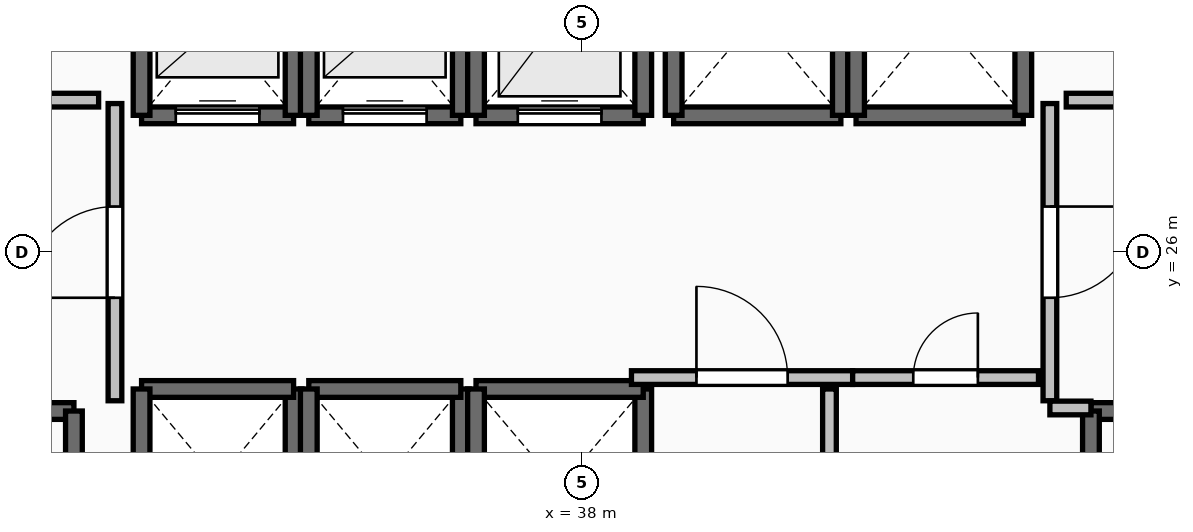
"""IFC4 building model, lengths in metres.
Left out: names, types, materials, properties, quantities, classifications, styles, units other than length and angle.
Written with IfcOpenShell. Run it as: python <this file> out.ifc"""

import sys

from ifc_helpers import new_model, si_unit, direction, frame, frame_2d, origin, place, context, subcontext, project, spatial, rectangle, extrude, element, fill, save


model = new_model("IFC4")
c1 = context("Model", 3, precision=1e-05, world=origin(), true_north=direction((0.0, 1.0)))
c2 = subcontext(c1, "Body", "Model", "MODEL_VIEW")
j1 = project(units=[si_unit("LENGTHUNIT", "METRE"), si_unit("PLANEANGLEUNIT", "RADIAN")], contexts=[c1])
p1 = place(None, origin())
s1 = spatial("IfcSite", under=j1, at=p1, CompositionType="ELEMENT")
p2 = place(p1, origin())
s2 = spatial("IfcBuilding", under=s1, at=p2, CompositionType="ELEMENT")
p3 = place(p2, frame((0.0, 0.0, 82.3)))
s3 = spatial("IfcBuildingStorey", under=s2, at=p3, CompositionType="ELEMENT", Elevation=82.3)
p4 = place(p3, frame((27.94, 23.91, 0.0), z_axis=(0.0, 0.0, 1.0), x_axis=(1.0, 0.0, 0.0)))
e1 = element("IfcWall", 1, at=p4, inside=s3, PredefinedType="SOLIDWALL", context=c2, shape_type="SweptSolid", body=[
    extrude(rectangle(XDim=3.37, YDim=0.22, at=frame_2d((1.685, 0.0))), origin(), (0.0, 0.0, 1.0), 3.24),
])
p5 = place(p4, frame((1.135, 0.0, 0.0)))
e2 = element("IfcOpeningElement", 2, at=p5, cuts=e1, PredefinedType="OPENING", context=c2, shape_type="SweptSolid", body=[
    extrude(rectangle(XDim=1.1, YDim=2.15, at=frame_2d((0.55, 1.075))), frame((0.0, 0.125, 0.0), z_axis=(0.0, -1.0, 0.0), x_axis=(1.0, 0.0, 0.0)), (0.0, 0.0, 1.0), 0.25),
])
p6 = place(p3, frame((31.31, 23.91, 0.0), z_axis=(0.0, 0.0, 1.0), x_axis=(0.0, -1.0, 0.0)))
e3 = element("IfcWall", 3, at=p6, inside=s3, PredefinedType="SOLIDWALL", context=c2, shape_type="SweptSolid", body=[
    extrude(rectangle(XDim=7.42, YDim=0.22, at=frame_2d((3.71, 0.0))), origin(), (0.0, 0.0, 1.0), 3.24),
])
p7 = place(p3, frame((44.69, 23.91, 0.0), z_axis=(0.0, 0.0, 1.0), x_axis=(1.0, 0.0, 0.0)))
e4 = element("IfcWall", 4, at=p7, inside=s3, PredefinedType="SOLIDWALL", context=c2, shape_type="SweptSolid", body=[
    extrude(rectangle(XDim=3.37, YDim=0.22, at=frame_2d((1.685, 0.0))), origin(), (0.0, 0.0, 1.0), 3.24),
])
p8 = place(p7, frame((1.135, 0.0, 0.0)))
e5 = element("IfcOpeningElement", 5, at=p8, cuts=e4, PredefinedType="OPENING", context=c2, shape_type="SweptSolid", body=[
    extrude(rectangle(XDim=1.1, YDim=2.15, at=frame_2d((0.55, 1.075))), frame((0.0, 0.125, 0.0), z_axis=(0.0, -1.0, 0.0), x_axis=(1.0, 0.0, 0.0)), (0.0, 0.0, 1.0), 0.25),
])
p9 = place(p3, frame((44.69, 16.49, 0.0), z_axis=(0.0, 0.0, 1.0), x_axis=(0.0, 1.0, 0.0)))
e6 = element("IfcWall", 6, at=p9, inside=s3, PredefinedType="SOLIDWALL", context=c2, shape_type="SweptSolid", body=[
    extrude(rectangle(XDim=7.42, YDim=0.22, at=frame_2d((3.71, 0.0))), origin(), (0.0, 0.0, 1.0), 3.24),
])
p10 = place(p3, frame((32.2, 27.8, 0.0), z_axis=(0.0, 0.0, 1.0), x_axis=(1.0, 0.0, 0.0)))
e7 = element("IfcWall", 7, at=p10, inside=s3, PredefinedType="SOLIDWALL", context=c2, shape_type="SweptSolid", body=[
    extrude(rectangle(XDim=2.0, YDim=0.22, at=frame_2d((1.0, 0.0))), origin(), (0.0, 0.0, 1.0), 3.24),
])
p11 = place(p10, frame((0.45, 0.0, 0.0)))
e8 = element("IfcOpeningElement", 8, at=p11, cuts=e7, PredefinedType="OPENING", context=c2, shape_type="SweptSolid", body=[
    extrude(rectangle(XDim=1.1, YDim=2.2, at=frame_2d((0.55, 1.1))), frame((0.0, 0.125, 0.0), z_axis=(0.0, -1.0, 0.0), x_axis=(1.0, 0.0, 0.0)), (0.0, 0.0, 1.0), 0.25),
])
for number, where, z_axis, x_axis in (
    (9, (34.2, 27.8, 0.0), (0.0, 0.0, 1.0), (0.0, 1.0, 0.0)),
    (10, (32.2, 30.2, 0.0), (0.0, 0.0, 1.0), (0.0, -1.0, 0.0)),
):
    element("IfcWall", number, at=place(p3, frame(where, z_axis=z_axis, x_axis=x_axis)), inside=s3, PredefinedType="SOLIDWALL", context=c2, shape_type="SweptSolid", body=[
        extrude(rectangle(XDim=2.4, YDim=0.22, at=frame_2d((1.2, 0.0))), origin(), (0.0, 0.0, 1.0), 3.24),
    ])
p12 = place(p3, frame((34.4, 27.8, 0.0), z_axis=(0.0, 0.0, 1.0), x_axis=(1.0, 0.0, 0.0)))
e11 = element("IfcWall", 11, at=p12, inside=s3, PredefinedType="SOLIDWALL", context=c2, shape_type="SweptSolid", body=[
    extrude(rectangle(XDim=2.0, YDim=0.22, at=frame_2d((1.0, 0.0))), origin(), (0.0, 0.0, 1.0), 3.24),
])
p13 = place(p12, frame((0.45, 0.0, 0.0)))
e12 = element("IfcOpeningElement", 12, at=p13, cuts=e11, PredefinedType="OPENING", context=c2, shape_type="SweptSolid", body=[
    extrude(rectangle(XDim=1.1, YDim=2.2, at=frame_2d((0.55, 1.1))), frame((0.0, 0.125, 0.0), z_axis=(0.0, -1.0, 0.0), x_axis=(1.0, 0.0, 0.0)), (0.0, 0.0, 1.0), 0.25),
])
for number, where, z_axis, x_axis in (
    (13, (36.4, 27.8, 0.0), (0.0, 0.0, 1.0), (0.0, 1.0, 0.0)),
    (14, (34.4, 30.2, 0.0), (0.0, 0.0, 1.0), (0.0, -1.0, 0.0)),
):
    element("IfcWall", number, at=place(p3, frame(where, z_axis=z_axis, x_axis=x_axis)), inside=s3, PredefinedType="SOLIDWALL", context=c2, shape_type="SweptSolid", body=[
        extrude(rectangle(XDim=2.4, YDim=0.22, at=frame_2d((1.2, 0.0))), origin(), (0.0, 0.0, 1.0), 3.24),
    ])
p14 = place(p3, frame((36.6, 27.8, 0.0), z_axis=(0.0, 0.0, 1.0), x_axis=(1.0, 0.0, 0.0)))
e15 = element("IfcWall", 15, at=p14, inside=s3, PredefinedType="SOLIDWALL", context=c2, shape_type="SweptSolid", body=[
    extrude(rectangle(XDim=2.2, YDim=0.22, at=frame_2d((1.1, 0.0))), origin(), (0.0, 0.0, 1.0), 3.24),
])
p15 = place(p14, frame((0.55, 0.0, 0.0)))
e16 = element("IfcOpeningElement", 16, at=p15, cuts=e15, PredefinedType="OPENING", context=c2, shape_type="SweptSolid", body=[
    extrude(rectangle(XDim=1.1, YDim=2.2, at=frame_2d((0.55, 1.1))), frame((0.0, 0.125, 0.0), z_axis=(0.0, -1.0, 0.0), x_axis=(1.0, 0.0, 0.0)), (0.0, 0.0, 1.0), 0.25),
])
for number, where, z_axis, x_axis in (
    (17, (38.8, 27.8, 0.0), (0.0, 0.0, 1.0), (0.0, 1.0, 0.0)),
    (18, (36.6, 30.4, 0.0), (0.0, 0.0, 1.0), (0.0, -1.0, 0.0)),
):
    element("IfcWall", number, at=place(p3, frame(where, z_axis=z_axis, x_axis=x_axis)), inside=s3, PredefinedType="SOLIDWALL", context=c2, shape_type="SweptSolid", body=[
        extrude(rectangle(XDim=2.6, YDim=0.22, at=frame_2d((1.3, 0.0))), origin(), (0.0, 0.0, 1.0), 3.24),
    ])
p16 = place(p3, frame((34.2, 21.8, 0.0), z_axis=(0.0, 0.0, 1.0), x_axis=(0.0, 1.0, 0.0)))
e19 = element("IfcWall", 19, at=p16, inside=s3, PredefinedType="SOLIDWALL", context=c2, shape_type="SweptSolid", body=[
    extrude(rectangle(XDim=2.4, YDim=0.22, at=frame_2d((1.2, 0.0))), origin(), (0.0, 0.0, 1.0), 3.24),
])
p17 = place(p3, frame((34.2, 24.2, 0.0), z_axis=(0.0, 0.0, 1.0), x_axis=(-1.0, 0.0, 0.0)))
e20 = element("IfcWall", 20, at=p17, inside=s3, PredefinedType="SOLIDWALL", context=c2, shape_type="SweptSolid", body=[
    extrude(rectangle(XDim=2.0, YDim=0.22, at=frame_2d((1.0, 0.0))), origin(), (0.0, 0.0, 1.0), 3.24),
])
for number, where, z_axis, x_axis in (
    (21, (32.2, 24.2, 0.0), (0.0, 0.0, 1.0), (0.0, -1.0, 0.0)),
    (22, (36.4, 21.8, 0.0), (0.0, 0.0, 1.0), (0.0, 1.0, 0.0)),
):
    element("IfcWall", number, at=place(p3, frame(where, z_axis=z_axis, x_axis=x_axis)), inside=s3, PredefinedType="SOLIDWALL", context=c2, shape_type="SweptSolid", body=[
        extrude(rectangle(XDim=2.4, YDim=0.22, at=frame_2d((1.2, 0.0))), origin(), (0.0, 0.0, 1.0), 3.24),
    ])
p18 = place(p3, frame((36.4, 24.2, 0.0), z_axis=(0.0, 0.0, 1.0), x_axis=(-1.0, 0.0, 0.0)))
e23 = element("IfcWall", 23, at=p18, inside=s3, PredefinedType="SOLIDWALL", context=c2, shape_type="SweptSolid", body=[
    extrude(rectangle(XDim=2.0, YDim=0.22, at=frame_2d((1.0, 0.0))), origin(), (0.0, 0.0, 1.0), 3.24),
])
p19 = place(p3, frame((34.4, 24.2, 0.0), z_axis=(0.0, 0.0, 1.0), x_axis=(0.0, -1.0, 0.0)))
e24 = element("IfcWall", 24, at=p19, inside=s3, PredefinedType="SOLIDWALL", context=c2, shape_type="SweptSolid", body=[
    extrude(rectangle(XDim=2.4, YDim=0.22, at=frame_2d((1.2, 0.0))), origin(), (0.0, 0.0, 1.0), 3.24),
])
p20 = place(p3, frame((38.8, 21.6, 0.0), z_axis=(0.0, 0.0, 1.0), x_axis=(0.0, 1.0, 0.0)))
e25 = element("IfcWall", 25, at=p20, inside=s3, PredefinedType="SOLIDWALL", context=c2, shape_type="SweptSolid", body=[
    extrude(rectangle(XDim=2.6, YDim=0.22, at=frame_2d((1.3, 0.0))), origin(), (0.0, 0.0, 1.0), 3.24),
])
p21 = place(p3, frame((38.8, 24.2, 0.0), z_axis=(0.0, 0.0, 1.0), x_axis=(-1.0, 0.0, 0.0)))
e26 = element("IfcWall", 26, at=p21, inside=s3, PredefinedType="SOLIDWALL", context=c2, shape_type="SweptSolid", body=[
    extrude(rectangle(XDim=2.2, YDim=0.22, at=frame_2d((1.1, 0.0))), origin(), (0.0, 0.0, 1.0), 3.24),
])
p22 = place(p3, frame((36.6, 24.2, 0.0), z_axis=(0.0, 0.0, 1.0), x_axis=(0.0, -1.0, 0.0)))
e27 = element("IfcWall", 27, at=p22, inside=s3, PredefinedType="SOLIDWALL", context=c2, shape_type="SweptSolid", body=[
    extrude(rectangle(XDim=2.6, YDim=0.22, at=frame_2d((1.3, 0.0))), origin(), (0.0, 0.0, 1.0), 3.24),
])
p23 = place(p3, frame((39.2, 27.8, 0.0), z_axis=(0.0, 0.0, 1.0), x_axis=(1.0, 0.0, 0.0)))
e28 = element("IfcWall", 28, at=p23, inside=s3, PredefinedType="SOLIDWALL", context=c2, shape_type="SweptSolid", body=[
    extrude(rectangle(XDim=2.2, YDim=0.22, at=frame_2d((1.1, 0.0))), origin(), (0.0, 0.0, 1.0), 3.24),
])
for number, where, z_axis, x_axis in (
    (29, (41.4, 27.8, 0.0), (0.0, 0.0, 1.0), (0.0, 1.0, 0.0)),
    (30, (39.2, 30.4, 0.0), (0.0, 0.0, 1.0), (0.0, -1.0, 0.0)),
):
    element("IfcWall", number, at=place(p3, frame(where, z_axis=z_axis, x_axis=x_axis)), inside=s3, PredefinedType="SOLIDWALL", context=c2, shape_type="SweptSolid", body=[
        extrude(rectangle(XDim=2.6, YDim=0.22, at=frame_2d((1.3, 0.0))), origin(), (0.0, 0.0, 1.0), 3.24),
    ])
p24 = place(p3, frame((41.6, 27.8, 0.0), z_axis=(0.0, 0.0, 1.0), x_axis=(1.0, 0.0, 0.0)))
e31 = element("IfcWall", 31, at=p24, inside=s3, PredefinedType="SOLIDWALL", context=c2, shape_type="SweptSolid", body=[
    extrude(rectangle(XDim=2.2, YDim=0.22, at=frame_2d((1.1, 0.0))), origin(), (0.0, 0.0, 1.0), 3.24),
])
for number, where, z_axis, x_axis in (
    (32, (43.8, 27.8, 0.0), (0.0, 0.0, 1.0), (0.0, 1.0, 0.0)),
    (33, (41.6, 30.4, 0.0), (0.0, 0.0, 1.0), (0.0, -1.0, 0.0)),
):
    element("IfcWall", number, at=place(p3, frame(where, z_axis=z_axis, x_axis=x_axis)), inside=s3, PredefinedType="SOLIDWALL", context=c2, shape_type="SweptSolid", body=[
        extrude(rectangle(XDim=2.6, YDim=0.22, at=frame_2d((1.3, 0.0))), origin(), (0.0, 0.0, 1.0), 3.24),
    ])
p25 = place(p3, frame((31.85, 24.045, 0.0), z_axis=(0.0, 0.0, 1.0), x_axis=(0.0, 1.0, 0.0)))
e34 = element("IfcWall", 34, at=p25, inside=s3, PredefinedType="PARTITIONING", context=c2, shape_type="SweptSolid", body=[
    extrude(rectangle(XDim=3.91, YDim=0.18, at=frame_2d((1.955, 0.0))), origin(), (0.0, 0.0, 1.0), 3.24),
])
p26 = place(p25, frame((1.355, 0.0, 0.0)))
e35 = element("IfcOpeningElement", 35, at=p26, cuts=e34, PredefinedType="OPENING", context=c2, shape_type="SweptSolid", body=[
    extrude(rectangle(XDim=1.2, YDim=2.15, at=frame_2d((0.6, 1.075))), frame((0.0, 0.105, 0.0), z_axis=(0.0, -1.0, 0.0), x_axis=(1.0, 0.0, 0.0)), (0.0, 0.0, 1.0), 0.21),
])
p27 = place(p3, frame((44.15, 27.955, 0.0), z_axis=(0.0, 0.0, 1.0), x_axis=(0.0, -1.0, 0.0)))
e36 = element("IfcWall", 36, at=p27, inside=s3, PredefinedType="PARTITIONING", context=c2, shape_type="SweptSolid", body=[
    extrude(rectangle(XDim=3.91, YDim=0.18, at=frame_2d((1.955, 0.0))), origin(), (0.0, 0.0, 1.0), 3.24),
])
p28 = place(p27, frame((1.355, 0.0, 0.0)))
e37 = element("IfcOpeningElement", 37, at=p28, cuts=e36, PredefinedType="OPENING", context=c2, shape_type="SweptSolid", body=[
    extrude(rectangle(XDim=1.2, YDim=2.15, at=frame_2d((0.6, 1.075))), frame((0.0, 0.105, 0.0), z_axis=(0.0, -1.0, 0.0), x_axis=(1.0, 0.0, 0.0)), (0.0, 0.0, 1.0), 0.21),
])
p29 = place(p3, frame((44.15, 23.95, 0.0), z_axis=(0.0, 0.0, 1.0), x_axis=(1.0, 0.0, 0.0)))
e38 = element("IfcWall", 38, at=p29, inside=s3, PredefinedType="PARTITIONING", context=c2, shape_type="SweptSolid", body=[
    extrude(rectangle(XDim=0.54, YDim=0.18, at=frame_2d((0.27, 0.0))), origin(), (0.0, 0.0, 1.0), 3.24),
])
p30 = place(p3, frame((38.645, 24.35, 0.0), z_axis=(0.0, 0.0, 1.0), x_axis=(1.0, 0.0, 0.0)))
e39 = element("IfcWall", 39, at=p30, inside=s3, PredefinedType="PARTITIONING", context=c2, shape_type="SweptSolid", body=[
    extrude(rectangle(XDim=2.91, YDim=0.18, at=frame_2d((1.455, 0.0))), origin(), (0.0, 0.0, 1.0), 3.24),
])
p31 = place(p30, frame((0.855, 0.0, 0.0)))
e40 = element("IfcOpeningElement", 40, at=p31, cuts=e39, PredefinedType="OPENING", context=c2, shape_type="SweptSolid", body=[
    extrude(rectangle(XDim=1.2, YDim=2.15, at=frame_2d((0.6, 1.075))), frame((0.0, 0.105, 0.0), z_axis=(0.0, -1.0, 0.0), x_axis=(1.0, 0.0, 0.0)), (0.0, 0.0, 1.0), 0.21),
])
p32 = place(p3, frame((41.555, 24.35, 0.0), z_axis=(0.0, 0.0, 1.0), x_axis=(1.0, 0.0, 0.0)))
e41 = element("IfcWall", 41, at=p32, inside=s3, PredefinedType="PARTITIONING", context=c2, shape_type="SweptSolid", body=[
    extrude(rectangle(XDim=2.445, YDim=0.18, at=frame_2d((1.223, 0.0))), origin(), (0.0, 0.0, 1.0), 3.24),
])
p33 = place(p32, frame((0.798, 0.0, 0.0)))
e42 = element("IfcOpeningElement", 42, at=p33, cuts=e41, PredefinedType="OPENING", context=c2, shape_type="SweptSolid", body=[
    extrude(rectangle(XDim=0.85, YDim=2.1, at=frame_2d((0.425, 1.05))), frame((0.0, 0.105, 0.0), z_axis=(0.0, -1.0, 0.0), x_axis=(1.0, 0.0, 0.0)), (0.0, 0.0, 1.0), 0.21),
])
p34 = place(p3, frame((41.25, 20.305, 0.0), z_axis=(0.0, 0.0, 1.0), x_axis=(0.0, 1.0, 0.0)))
e43 = element("IfcWall", 43, at=p34, inside=s3, PredefinedType="PARTITIONING", context=c2, shape_type="SweptSolid", body=[
    extrude(rectangle(XDim=3.895, YDim=0.18, at=frame_2d((1.948, 0.0))), origin(), (0.0, 0.0, 1.0), 3.24),
])
p35 = place(p34, frame((1.522, 0.0, 0.0)))
e44 = element("IfcOpeningElement", 44, at=p35, cuts=e43, PredefinedType="OPENING", context=c2, shape_type="SweptSolid", body=[
    extrude(rectangle(XDim=0.85, YDim=2.1, at=frame_2d((0.425, 1.05))), frame((0.0, 0.105, 0.0), z_axis=(0.0, -1.0, 0.0), x_axis=(1.0, 0.0, 0.0)), (0.0, 0.0, 1.0), 0.21),
])
for number, where, z_axis, x_axis in (
    (45, (31.635, 28.0, 0.0), (0.0, 0.0, 1.0), (-1.0, 0.0, 0.0)),
    (46, (45.28, 28.0, 0.0), (0.0, 0.0, 1.0), (-1.0, 0.0, 0.0)),
):
    element("IfcWall", number, at=place(p3, frame(where, z_axis=z_axis, x_axis=x_axis)), inside=s3, PredefinedType="PARTITIONING", context=c2, shape_type="SweptSolid", body=[
        extrude(rectangle(XDim=0.915, YDim=0.18, at=frame_2d((0.458, 0.0))), origin(), (0.0, 0.0, 1.0), 3.24),
    ])
p36 = place(p11, origin())
e47 = element("IfcDoor", 47, at=p36, inside=s3, OperationType="SLIDING_TO_LEFT", PredefinedType="DOOR", context=c2, shape_type="SweptSolid", body=[
    extrude(rectangle(XDim=1.1, YDim=2.2, at=frame_2d((0.55, 1.1))), frame((0.0, 0.025, 0.0), z_axis=(0.0, -1.0, 0.0), x_axis=(1.0, 0.0, 0.0)), (0.0, 0.0, 1.0), 0.05),
])
fill(e8, e47)
p37 = place(p13, origin())
e48 = element("IfcDoor", 48, at=p37, inside=s3, OperationType="SLIDING_TO_LEFT", PredefinedType="DOOR", context=c2, shape_type="SweptSolid", body=[
    extrude(rectangle(XDim=1.1, YDim=2.2, at=frame_2d((0.55, 1.1))), frame((0.0, 0.025, 0.0), z_axis=(0.0, -1.0, 0.0), x_axis=(1.0, 0.0, 0.0)), (0.0, 0.0, 1.0), 0.05),
])
fill(e12, e48)
p38 = place(p15, origin())
e49 = element("IfcDoor", 49, at=p38, inside=s3, OperationType="SLIDING_TO_LEFT", PredefinedType="DOOR", context=c2, shape_type="SweptSolid", body=[
    extrude(rectangle(XDim=1.1, YDim=2.2, at=frame_2d((0.55, 1.1))), frame((0.0, 0.025, 0.0), z_axis=(0.0, -1.0, 0.0), x_axis=(1.0, 0.0, 0.0)), (0.0, 0.0, 1.0), 0.05),
])
fill(e16, e49)
p39 = place(p26, origin())
e50 = element("IfcDoor", 50, at=p39, inside=s3, OperationType="SINGLE_SWING_LEFT", PredefinedType="DOOR", context=c2, shape_type="SweptSolid", body=[
    extrude(rectangle(XDim=1.2, YDim=2.15, at=frame_2d((0.6, 1.075))), frame((0.0, 0.025, 0.0), z_axis=(0.0, -1.0, 0.0), x_axis=(1.0, 0.0, 0.0)), (0.0, 0.0, 1.0), 0.05),
])
fill(e35, e50)
p40 = place(p28, origin())
e51 = element("IfcDoor", 51, at=p40, inside=s3, OperationType="SINGLE_SWING_LEFT", PredefinedType="DOOR", context=c2, shape_type="SweptSolid", body=[
    extrude(rectangle(XDim=1.2, YDim=2.15, at=frame_2d((0.6, 1.075))), frame((0.0, 0.025, 0.0), z_axis=(0.0, -1.0, 0.0), x_axis=(1.0, 0.0, 0.0)), (0.0, 0.0, 1.0), 0.05),
])
fill(e37, e51)
p41 = place(p31, origin())
e52 = element("IfcDoor", 52, at=p41, inside=s3, OperationType="SINGLE_SWING_LEFT", PredefinedType="DOOR", context=c2, shape_type="SweptSolid", body=[
    extrude(rectangle(XDim=1.2, YDim=2.15, at=frame_2d((0.6, 1.075))), frame((0.0, 0.025, 0.0), z_axis=(0.0, -1.0, 0.0), x_axis=(1.0, 0.0, 0.0)), (0.0, 0.0, 1.0), 0.05),
])
fill(e40, e52)
p42 = place(p33, origin())
e53 = element("IfcDoor", 53, at=p42, inside=s3, OperationType="SINGLE_SWING_RIGHT", PredefinedType="DOOR", context=c2, shape_type="SweptSolid", body=[
    extrude(rectangle(XDim=0.85, YDim=2.1, at=frame_2d((0.425, 1.05))), frame((0.0, 0.025, 0.0), z_axis=(0.0, -1.0, 0.0), x_axis=(1.0, 0.0, 0.0)), (0.0, 0.0, 1.0), 0.05),
])
fill(e42, e53)
save(model, sys.argv[1])
